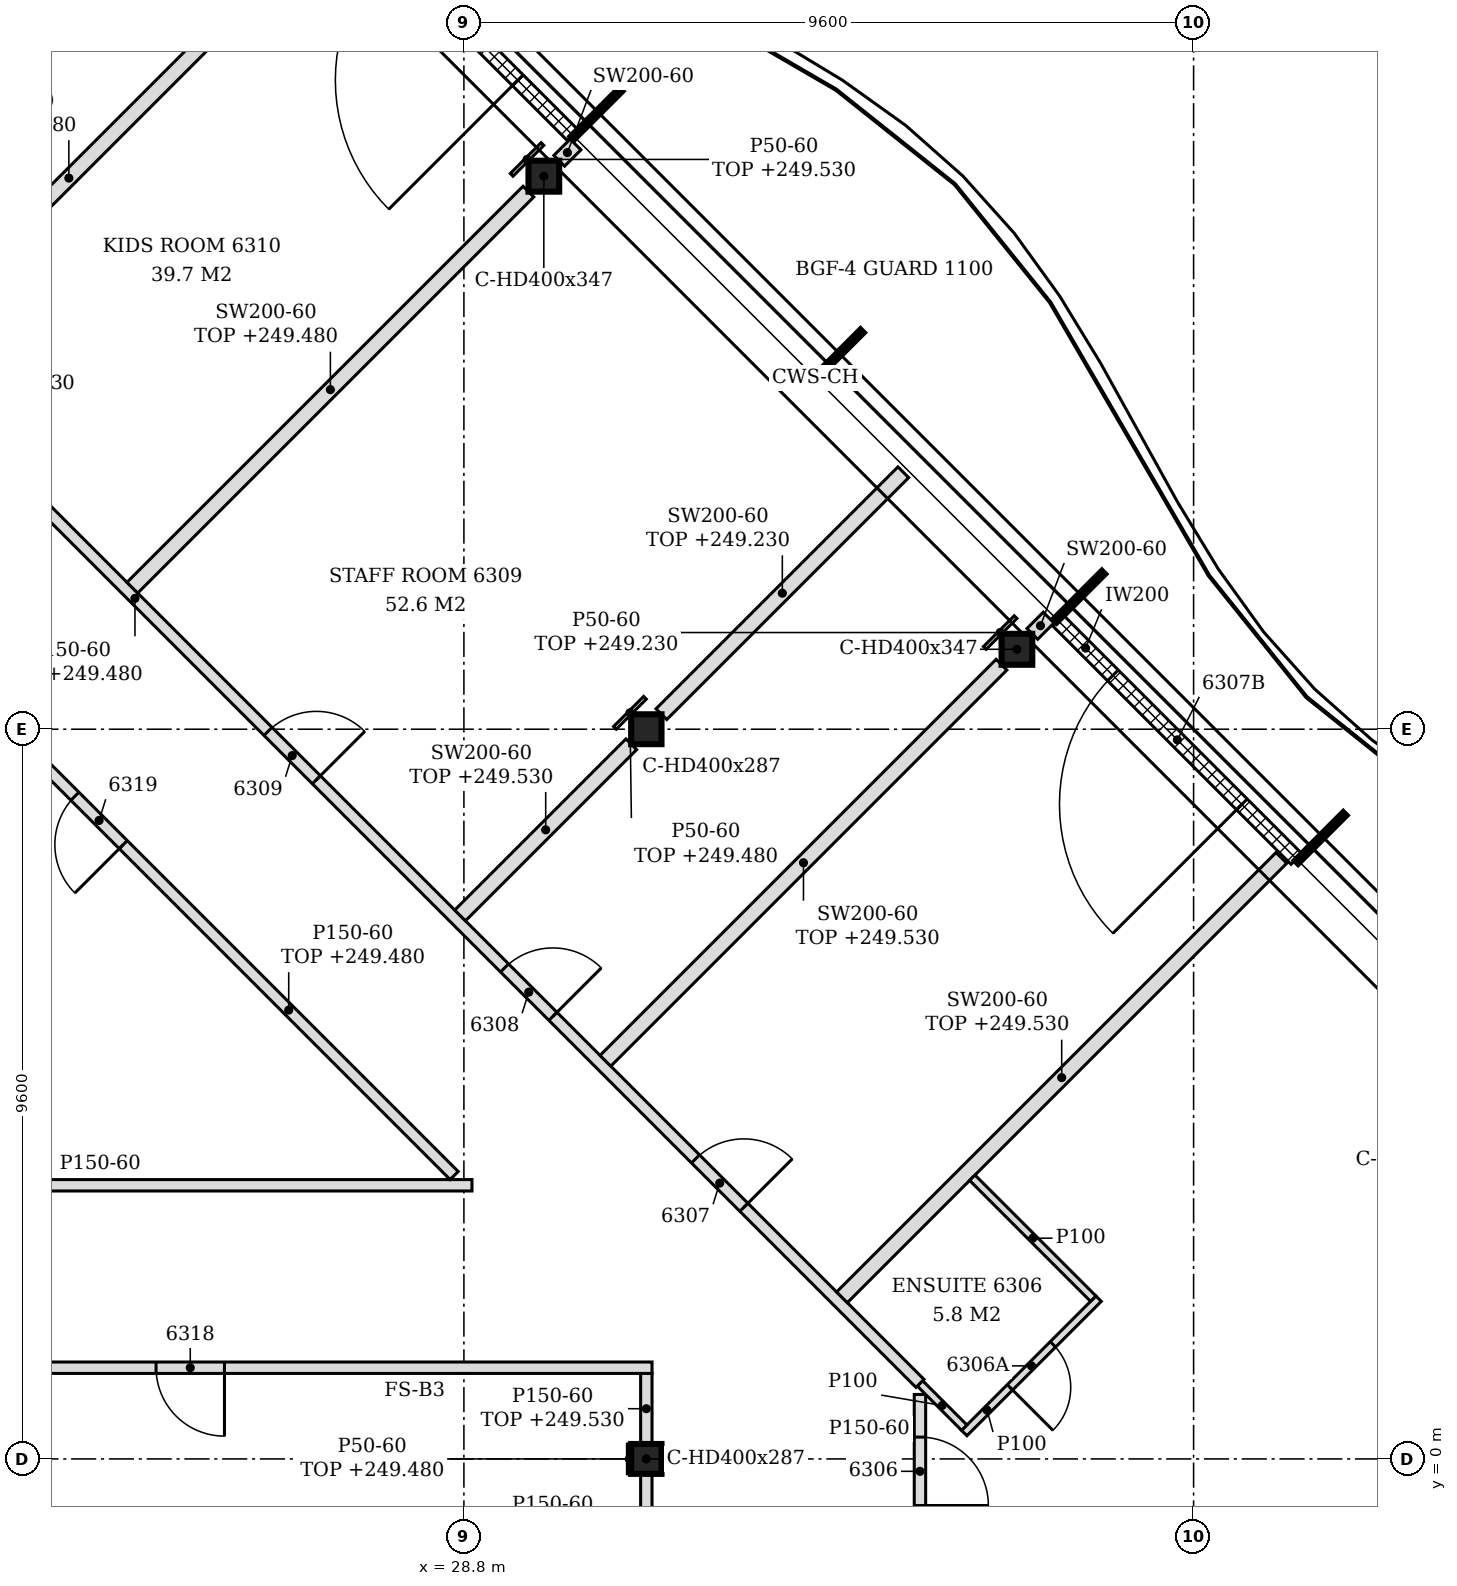
"""IFC4 building model, lengths in metres.
Left out: names, types, materials, properties, quantities, classifications, styles, units other than length and angle.
Written with IfcOpenShell. Run it as: python <this file> out.ifc"""

import sys

from ifc_helpers import new_model, si_unit, direction, frame, frame_2d, origin, origin_2d, place, context, subcontext, project, spatial, polyline, rectangle, i_section, outline, extrude, element, fill, save


model = new_model("IFC4")
c1 = context("Model", 3, precision=1e-05, world=origin(), true_north=direction((0.0, 1.0)))
c2 = subcontext(c1, "Body", "Model", "MODEL_VIEW")
j1 = project(units=[si_unit("LENGTHUNIT", "METRE"), si_unit("PLANEANGLEUNIT", "RADIAN")], contexts=[c1])
p1 = place(None, origin())
s1 = spatial("IfcSite", under=j1, at=p1, CompositionType="ELEMENT")
p2 = place(p1, origin())
s2 = spatial("IfcBuilding", under=s1, at=p2, CompositionType="ELEMENT")
p3 = place(p2, frame((0.0, 0.0, 246.6)))
s3 = spatial("IfcBuildingStorey", under=s2, at=p3, CompositionType="ELEMENT", Elevation=246.6)
for number, where, z_axis, x_axis in (
    (1, (36.076, 10.652, -0.15), (0.0, 0.0, 1.0), (1.0, 0.0, 0.0)),
    (2, (29.852, 16.876, -0.15), (0.0, 0.0, 1.0), (1.0, 0.0, 0.0)),
):
    element("IfcColumn", number, at=place(p3, frame(where, z_axis=z_axis, x_axis=x_axis)), inside=s3, PredefinedType="COLUMN", context=c2, shape_type="SweptSolid", body=[
        extrude(i_section(OverallWidth=0.404, OverallDepth=0.407, WebThickness=0.027, FlangeThickness=0.044, FilletRadius=0.015, at=origin_2d()), origin(), (0.0, 0.0, 1.0), 3.6),
    ])
for number, where, z_axis, x_axis in (
    (3, (31.2, 0.0, -0.15), (0.0, 0.0, 1.0), (1.0, 0.0, 0.0)),
    (4, (31.2, 9.6, -0.15), (0.0, 0.0, 1.0), (1.0, 0.0, 0.0)),
):
    element("IfcColumn", number, at=place(p3, frame(where, z_axis=z_axis, x_axis=x_axis)), inside=s3, PredefinedType="COLUMN", context=c2, shape_type="SweptSolid", body=[
        extrude(i_section(OverallWidth=0.399, OverallDepth=0.393, WebThickness=0.023, FlangeThickness=0.037, FilletRadius=0.015, at=origin_2d()), origin(), (0.0, 0.0, 1.0), 3.6),
    ])
p4 = place(p3, frame((39.753, 7.893, 0.0), z_axis=(0.0, 0.0, 1.0), x_axis=(-0.707106781187, 0.707106781187, 0.0)))
e5 = element("IfcWall", 5, at=p4, inside=s3, PredefinedType="NOTDEFINED", context=c2, shape_type="SweptSolid", body=[
    extrude(rectangle(XDim=4.431, YDim=0.2, at=frame_2d((2.215, 0.0))), origin(), (0.0, 0.0, 1.0), 3.45),
])
p5 = place(p4, frame((1.015, 0.0, 0.0)))
e6 = element("IfcOpeningElement", 6, at=p5, cuts=e5, PredefinedType="OPENING", context=c2, shape_type="SweptSolid", body=[
    extrude(rectangle(XDim=2.4, YDim=2.4, at=frame_2d((1.2, 1.2))), frame((0.0, 0.11, 0.0), z_axis=(0.0, -1.0, 0.0), x_axis=(1.0, 0.0, 0.0)), (0.0, 0.0, 1.0), 0.22),
])
p6 = place(p3, frame((30.226, 17.42, 0.0), z_axis=(0.0, 0.0, 1.0), x_axis=(-0.707079231393, 0.707134329907, 0.0)))
e7 = element("IfcWall", 7, at=p6, inside=s3, PredefinedType="NOTDEFINED", context=c2, shape_type="SweptSolid", body=[
    extrude(rectangle(XDim=4.431, YDim=0.2, at=frame_2d((2.215, 0.0))), origin(), (0.0, 0.0, 1.0), 3.45),
])
p7 = place(p6, frame((1.015, 0.0, 0.0)))
e8 = element("IfcOpeningElement", 8, at=p7, cuts=e7, PredefinedType="OPENING", context=c2, shape_type="SweptSolid", body=[
    extrude(rectangle(XDim=2.4, YDim=2.4, at=frame_2d((1.2, 1.2))), frame((0.0, 0.11, 0.0), z_axis=(0.0, -1.0, 0.0), x_axis=(1.0, 0.0, 0.0)), (0.0, 0.0, 1.0), 0.22),
])
p8 = place(p3, frame((31.2, -1.345, 0.0), z_axis=(0.0, 0.0, 1.0), x_axis=(0.0, 1.0, 0.0)))
e9 = element("IfcWall", 9, at=p8, inside=s3, PredefinedType="PARTITIONING", context=c2, shape_type="SweptSolid", body=[
    extrude(rectangle(XDim=1.148, YDim=0.15, at=frame_2d((0.574, 0.0))), origin(), (0.0, 0.0, 1.0), 2.93),
])
p9 = place(p3, frame((34.8, -1.14, 0.0), z_axis=(0.0, 0.0, 1.0), x_axis=(0.0, 1.0, 0.0)))
e10 = element("IfcWall", 10, at=p9, inside=s3, PredefinedType="PARTITIONING", context=c2, shape_type="SweptSolid", body=[
    extrude(outline(polyline([(0.0, 0.0), (1.988, 0.0), (1.988, 3.45), (1.245, 3.45), (1.243, 2.88), (1.035, 2.88), (1.033, 3.45), (0.0, 3.45), (0.0, 0.0)])), frame((0.0, 0.075, 0.0), z_axis=(0.0, -1.0, 0.0), x_axis=(1.0, 0.0, 0.0)), (0.0, 0.0, 1.0), 0.15),
])
p10 = place(p9, frame((0.527, 0.0, 0.0)))
e11 = element("IfcOpeningElement", 11, at=p10, cuts=e10, PredefinedType="OPENING", context=c2, shape_type="SweptSolid", body=[
    extrude(rectangle(XDim=0.9, YDim=2.1, at=frame_2d((0.45, 1.05))), frame((0.0, 0.085, 0.0), z_axis=(0.0, -1.0, 0.0), x_axis=(1.0, 0.0, 0.0)), (0.0, 0.0, 1.0), 0.17),
])
p11 = place(p3, frame((31.2, 0.197, 0.0), z_axis=(0.0, 0.0, 1.0), x_axis=(0.0, 1.0, 0.0)))
e12 = element("IfcWall", 12, at=p11, inside=s3, PredefinedType="PARTITIONING", context=c2, shape_type="SweptSolid", body=[
    extrude(rectangle(XDim=0.928, YDim=0.15, at=frame_2d((0.464, 0.0))), origin(), (0.0, 0.0, 1.0), 2.93),
])
p12 = place(p3, frame((35.383, 0.341, 0.0), z_axis=(0.0, 0.0, 1.0), x_axis=(0.707106781187, 0.707106781187, 0.0)))
e13 = element("IfcWall", 13, at=p12, inside=s3, PredefinedType="PARTITIONING", context=c2, shape_type="SweptSolid", body=[
    extrude(rectangle(XDim=2.5, YDim=0.1, at=frame_2d((1.25, 0.0))), origin(), (0.0, 0.0, 1.0), 3.45),
])
p13 = place(p12, frame((0.85, 0.0, 0.0)))
e14 = element("IfcOpeningElement", 14, at=p13, cuts=e13, PredefinedType="OPENING", context=c2, shape_type="SweptSolid", body=[
    extrude(rectangle(XDim=0.8, YDim=2.1, at=frame_2d((0.4, 1.05))), frame((0.0, 0.06, 0.0), z_axis=(0.0, -1.0, 0.0), x_axis=(1.0, 0.0, 0.0)), (0.0, 0.0, 1.0), 0.12),
])
p14 = place(p3, frame((35.383, 0.411, 0.0), z_axis=(0.0, 0.0, 1.0), x_axis=(-0.707106781187, 0.707106781187, 0.0)))
e15 = element("IfcWall", 15, at=p14, inside=s3, PredefinedType="PARTITIONING", context=c2, shape_type="SweptSolid", body=[
    extrude(rectangle(XDim=0.824, YDim=0.1, at=frame_2d((0.412, 0.0))), origin(), (0.0, 0.0, 1.0), 3.45),
])
p15 = place(p3, frame((34.8, 0.994, 0.0), z_axis=(0.0, 0.0, 1.0), x_axis=(-0.707099634543, 0.707113927758, 0.0)))
e16 = element("IfcWall", 16, at=p15, inside=s3, PredefinedType="PARTITIONING", context=c2, shape_type="SweptSolid", body=[
    extrude(rectangle(XDim=17.081, YDim=0.15, at=frame_2d((8.541, 0.0))), origin(), (0.0, 0.0, 1.0), 2.88),
])
p16 = place(p15, frame((3.276, 0.0, 0.0)))
e17 = element("IfcOpeningElement", 17, at=p16, cuts=e16, PredefinedType="OPENING", context=c2, shape_type="SweptSolid", body=[
    extrude(rectangle(XDim=0.9, YDim=2.1, at=frame_2d((0.45, 1.05))), frame((0.0, 0.085, 0.0), z_axis=(0.0, -1.0, 0.0), x_axis=(1.0, 0.0, 0.0)), (0.0, 0.0, 1.0), 0.17),
])
p17 = place(p15, frame((6.829, 0.0, 0.0)))
e18 = element("IfcOpeningElement", 18, at=p17, cuts=e16, PredefinedType="OPENING", context=c2, shape_type="SweptSolid", body=[
    extrude(rectangle(XDim=0.9, YDim=2.1, at=frame_2d((0.45, 1.05))), frame((0.0, 0.085, 0.0), z_axis=(0.0, -1.0, 0.0), x_axis=(1.0, 0.0, 0.0)), (0.0, 0.0, 1.0), 0.17),
])
p18 = place(p15, frame((11.23, 0.0, 0.0)))
e19 = element("IfcOpeningElement", 19, at=p18, cuts=e16, PredefinedType="OPENING", context=c2, shape_type="SweptSolid", body=[
    extrude(rectangle(XDim=0.9, YDim=2.1, at=frame_2d((0.45, 1.05))), frame((0.0, 0.085, 0.0), z_axis=(0.0, -1.0, 0.0), x_axis=(1.0, 0.0, 0.0)), (0.0, 0.0, 1.0), 0.17),
])
p19 = place(p3, frame((19.125, 1.2, 0.0), z_axis=(0.0, 0.0, 1.0), x_axis=(1.0, 0.0, 0.0)))
e20 = element("IfcWall", 20, at=p19, inside=s3, PredefinedType="PARTITIONING", context=c2, shape_type="SweptSolid", body=[
    extrude(outline(polyline([(0.0, 0.0), (12.15, 0.0), (12.15, 2.93), (11.925, 2.93), (11.923, 3.45), (0.225, 3.45), (0.223, 2.83), (0.0, 2.83), (0.0, 0.0)])), frame((0.0, 0.075, 0.0), z_axis=(0.0, -1.0, 0.0), x_axis=(1.0, 0.0, 0.0)), (0.0, 0.0, 1.0), 0.15),
])
p20 = place(p19, frame((5.625, 0.0, 0.0)))
e21 = element("IfcOpeningElement", 21, at=p20, cuts=e20, PredefinedType="OPENING", context=c2, shape_type="SweptSolid", body=[
    extrude(rectangle(XDim=0.9, YDim=2.1, at=frame_2d((0.45, 1.05))), frame((0.0, 0.085, 0.0), z_axis=(0.0, -1.0, 0.0), x_axis=(1.0, 0.0, 0.0)), (0.0, 0.0, 1.0), 0.17),
])
p21 = place(p3, frame((33.774, 2.126, 0.0), z_axis=(0.0, 0.0, 1.0), x_axis=(0.707121711178, 0.70709185088, 0.0)))
e22 = element("IfcWall", 22, at=p21, inside=s3, PredefinedType="PARTITIONING", context=c2, shape_type="SweptSolid", body=[
    extrude(rectangle(XDim=8.176, YDim=0.2, at=frame_2d((4.088, 0.0))), origin(), (0.0, 0.0, 1.0), 2.93),
])
p22 = place(p3, frame((37.08, 2.108, 0.0), z_axis=(0.0, 0.0, 1.0), x_axis=(-0.707106781187, 0.707106781187, 0.0)))
e23 = element("IfcWall", 23, at=p22, inside=s3, PredefinedType="PARTITIONING", context=c2, shape_type="SweptSolid", body=[
    extrude(rectangle(XDim=2.25, YDim=0.1, at=frame_2d((1.125, 0.0))), origin(), (0.0, 0.0, 1.0), 3.45),
])
p23 = place(p3, frame((19.125, 3.6, 0.0), z_axis=(0.0, 0.0, 1.0), x_axis=(1.0, 0.0, 0.0)))
e24 = element("IfcWall", 24, at=p23, inside=s3, PredefinedType="PARTITIONING", context=c2, shape_type="SweptSolid", body=[
    extrude(outline(polyline([(0.0, 0.0), (9.781, 0.0), (9.781, 3.45), (0.225, 3.45), (0.223, 2.83), (0.0, 2.83), (0.0, 0.0)])), frame((0.0, 0.075, 0.0), z_axis=(0.0, -1.0, 0.0), x_axis=(1.0, 0.0, 0.0)), (0.0, 0.0, 1.0), 0.15),
])
p24 = place(p3, frame((28.672, 3.728, 0.0), z_axis=(0.0, 0.0, 1.0), x_axis=(-0.707106781187, 0.707106781187, 0.0)))
e25 = element("IfcWall", 25, at=p24, inside=s3, PredefinedType="PARTITIONING", context=c2, shape_type="SweptSolid", body=[
    extrude(rectangle(XDim=13.124, YDim=0.15, at=frame_2d((6.562, 0.0))), origin(), (0.0, 0.0, 1.0), 2.88),
])
p25 = place(p24, frame((6.157, 0.0, 0.0)))
e26 = element("IfcOpeningElement", 26, at=p25, cuts=e25, PredefinedType="OPENING", context=c2, shape_type="SweptSolid", body=[
    extrude(rectangle(XDim=0.9, YDim=2.1, at=frame_2d((0.45, 1.05))), frame((0.0, 0.085, 0.0), z_axis=(0.0, -1.0, 0.0), x_axis=(1.0, 0.0, 0.0)), (0.0, 0.0, 1.0), 0.17),
])
p26 = place(p3, frame((30.662, 5.238, 0.0), z_axis=(0.0, 0.0, 1.0), x_axis=(0.707106781187, 0.707106781187, 0.0)))
e27 = element("IfcWall", 27, at=p26, inside=s3, PredefinedType="PARTITIONING", context=c2, shape_type="SweptSolid", body=[
    extrude(rectangle(XDim=7.369, YDim=0.2, at=frame_2d((3.685, 0.0))), origin(), (0.0, 0.0, 1.0), 2.93),
])
p27 = place(p3, frame((28.75, 7.15, 0.0), z_axis=(0.0, 0.0, 1.0), x_axis=(0.7070684525, 0.707145107796, 0.0)))
e28 = element("IfcWall", 28, at=p27, inside=s3, PredefinedType="PARTITIONING", context=c2, shape_type="SweptSolid", body=[
    extrude(rectangle(XDim=3.185, YDim=0.2, at=frame_2d((1.592, 0.0))), origin(), (0.0, 0.0, 1.0), 2.93),
])
p28 = place(p3, frame((31.398, 9.798, 0.0), z_axis=(0.0, 0.0, 1.0), x_axis=(0.707133900936, 0.707079660397, 0.0)))
e29 = element("IfcWall", 29, at=p28, inside=s3, PredefinedType="PARTITIONING", context=c2, shape_type="SweptSolid", body=[
    extrude(rectangle(XDim=4.501, YDim=0.2, at=frame_2d((2.25, 0.0))), origin(), (0.0, 0.0, 1.0), 2.63),
])
p29 = place(p3, frame((36.278, 10.854, 0.0), z_axis=(0.0, 0.0, 1.0), x_axis=(0.707509117806, 0.706704215511, 0.0)))
e30 = element("IfcWall", 30, at=p29, inside=s3, PredefinedType="PARTITIONING", context=c2, shape_type="SweptSolid", body=[
    extrude(rectangle(XDim=0.303, YDim=0.2, at=frame_2d((0.152, 0.0))), origin(), (0.0, 0.0, 1.0), 3.45),
])
p30 = place(p3, frame((24.438, 11.462, 0.0), z_axis=(0.0, 0.0, 1.0), x_axis=(0.707090216072, 0.707123345913, 0.0)))
e31 = element("IfcWall", 31, at=p30, inside=s3, PredefinedType="PARTITIONING", context=c2, shape_type="SweptSolid", body=[
    extrude(rectangle(XDim=7.369, YDim=0.2, at=frame_2d((3.685, 0.0))), origin(), (0.0, 0.0, 1.0), 2.88),
])
p31 = place(p3, frame((20.098, 13.346, 0.0), z_axis=(0.0, 0.0, 1.0), x_axis=(0.707119095079, 0.70709446708, 0.0)))
e32 = element("IfcWall", 32, at=p31, inside=s3, PredefinedType="PARTITIONING", context=c2, shape_type="SweptSolid", body=[
    extrude(rectangle(XDim=9.913, YDim=0.2, at=frame_2d((4.957, 0.0))), origin(), (0.0, 0.0, 1.0), 2.88),
])
p32 = place(p3, frame((30.054, 17.078, 0.0), z_axis=(0.0, 0.0, 1.0), x_axis=(0.707106781187, 0.707106781187, 0.0)))
e33 = element("IfcWall", 33, at=p32, inside=s3, PredefinedType="PARTITIONING", context=c2, shape_type="SweptSolid", body=[
    extrude(rectangle(XDim=0.303, YDim=0.2, at=frame_2d((0.152, 0.0))), origin(), (0.0, 0.0, 1.0), 3.45),
])
p33 = place(p3, frame((30.976, -0.197, 0.0), z_axis=(0.0, 0.0, 1.0), x_axis=(0.0, 1.0, 0.0)))
e34 = element("IfcWall", 34, at=p33, inside=s3, PredefinedType="PARTITIONING", context=c2, shape_type="SweptSolid", body=[
    extrude(rectangle(XDim=0.393, YDim=0.05, at=frame_2d((0.197, 0.0))), origin(), (0.0, 0.0, 1.0), 2.88),
])
p34 = place(p3, frame((35.653, 10.669, 0.0), z_axis=(0.0, 0.0, 1.0), x_axis=(0.707106781187, 0.707106781187, 0.0)))
e35 = element("IfcWall", 35, at=p34, inside=s3, PredefinedType="PARTITIONING", context=c2, shape_type="SweptSolid", body=[
    extrude(rectangle(XDim=0.573, YDim=0.05, at=frame_2d((0.287, 0.0))), origin(), (0.0, 0.0, 1.0), 2.63),
])
p35 = place(p3, frame((30.786, 9.618, 0.0), z_axis=(0.0, 0.0, 1.0), x_axis=(0.707106781187, 0.707106781187, 0.0)))
e36 = element("IfcWall", 36, at=p35, inside=s3, PredefinedType="PARTITIONING", context=c2, shape_type="SweptSolid", body=[
    extrude(rectangle(XDim=0.56, YDim=0.05, at=frame_2d((0.28, 0.0))), origin(), (0.0, 0.0, 1.0), 2.88),
])
p36 = place(p3, frame((29.428, 16.893, 0.0), z_axis=(0.0, 0.0, 1.0), x_axis=(0.707106781187, 0.707106781187, 0.0)))
e37 = element("IfcWall", 37, at=p36, inside=s3, PredefinedType="PARTITIONING", context=c2, shape_type="SweptSolid", body=[
    extrude(rectangle(XDim=0.573, YDim=0.05, at=frame_2d((0.287, 0.0))), origin(), (0.0, 0.0, 1.0), 2.93),
])
p37 = place(p5, origin())
e38 = element("IfcDoor", 38, at=p37, inside=s3, OperationType="SINGLE_SWING_LEFT", PredefinedType="DOOR", context=c2, shape_type="SweptSolid", body=[
    extrude(rectangle(XDim=2.4, YDim=2.4, at=frame_2d((1.2, 1.2))), frame((0.0, 0.025, 0.0), z_axis=(0.0, -1.0, 0.0), x_axis=(1.0, 0.0, 0.0)), (0.0, 0.0, 1.0), 0.05),
])
fill(e6, e38)
p38 = place(p7, origin())
e39 = element("IfcDoor", 39, at=p38, inside=s3, OperationType="SINGLE_SWING_LEFT", PredefinedType="DOOR", context=c2, shape_type="SweptSolid", body=[
    extrude(rectangle(XDim=2.4, YDim=2.4, at=frame_2d((1.2, 1.2))), frame((0.0, 0.025, 0.0), z_axis=(0.0, -1.0, 0.0), x_axis=(1.0, 0.0, 0.0)), (0.0, 0.0, 1.0), 0.05),
])
fill(e8, e39)
p39 = place(p10, frame((0.9, 0.0, 0.0), z_axis=(0.0, 0.0, 1.0), x_axis=(-1.0, 0.0, 0.0)))
e40 = element("IfcDoor", 40, at=p39, inside=s3, OperationType="SINGLE_SWING_RIGHT", PredefinedType="DOOR", context=c2, shape_type="SweptSolid", body=[
    extrude(rectangle(XDim=0.9, YDim=2.1, at=frame_2d((0.45, 1.05))), frame((0.0, 0.025, 0.0), z_axis=(0.0, -1.0, 0.0), x_axis=(1.0, 0.0, 0.0)), (0.0, 0.0, 1.0), 0.05),
])
fill(e11, e40)
p40 = place(p13, frame((0.8, 0.0, 0.0), z_axis=(0.0, 0.0, 1.0), x_axis=(-1.0, 0.0, 0.0)))
e41 = element("IfcDoor", 41, at=p40, inside=s3, OperationType="SINGLE_SWING_RIGHT", PredefinedType="DOOR", context=c2, shape_type="SweptSolid", body=[
    extrude(rectangle(XDim=0.8, YDim=2.1, at=frame_2d((0.4, 1.05))), frame((0.0, 0.025, 0.0), z_axis=(0.0, -1.0, 0.0), x_axis=(1.0, 0.0, 0.0)), (0.0, 0.0, 1.0), 0.05),
])
fill(e14, e41)
p41 = place(p16, frame((0.9, 0.0, 0.0), z_axis=(0.0, 0.0, 1.0), x_axis=(-1.0, 0.0, 0.0)))
e42 = element("IfcDoor", 42, at=p41, inside=s3, OperationType="SINGLE_SWING_RIGHT", PredefinedType="DOOR", context=c2, shape_type="SweptSolid", body=[
    extrude(rectangle(XDim=0.9, YDim=2.1, at=frame_2d((0.45, 1.05))), frame((0.0, 0.025, 0.0), z_axis=(0.0, -1.0, 0.0), x_axis=(1.0, 0.0, 0.0)), (0.0, 0.0, 1.0), 0.05),
])
fill(e17, e42)
p42 = place(p17, frame((0.9, 0.0, 0.0), z_axis=(0.0, 0.0, 1.0), x_axis=(-1.0, 0.0, 0.0)))
e43 = element("IfcDoor", 43, at=p42, inside=s3, OperationType="SINGLE_SWING_RIGHT", PredefinedType="DOOR", context=c2, shape_type="SweptSolid", body=[
    extrude(rectangle(XDim=0.9, YDim=2.1, at=frame_2d((0.45, 1.05))), frame((0.0, 0.025, 0.0), z_axis=(0.0, -1.0, 0.0), x_axis=(1.0, 0.0, 0.0)), (0.0, 0.0, 1.0), 0.05),
])
fill(e18, e43)
p43 = place(p18, frame((0.9, 0.0, 0.0), z_axis=(0.0, 0.0, 1.0), x_axis=(-1.0, 0.0, 0.0)))
e44 = element("IfcDoor", 44, at=p43, inside=s3, OperationType="SINGLE_SWING_RIGHT", PredefinedType="DOOR", context=c2, shape_type="SweptSolid", body=[
    extrude(rectangle(XDim=0.9, YDim=2.1, at=frame_2d((0.45, 1.05))), frame((0.0, 0.025, 0.0), z_axis=(0.0, -1.0, 0.0), x_axis=(1.0, 0.0, 0.0)), (0.0, 0.0, 1.0), 0.05),
])
fill(e19, e44)
p44 = place(p20, frame((0.9, 0.0, 0.0), z_axis=(0.0, 0.0, 1.0), x_axis=(-1.0, 0.0, 0.0)))
e45 = element("IfcDoor", 45, at=p44, inside=s3, OperationType="SINGLE_SWING_LEFT", PredefinedType="DOOR", context=c2, shape_type="SweptSolid", body=[
    extrude(rectangle(XDim=0.9, YDim=2.1, at=frame_2d((0.45, 1.05))), frame((0.0, 0.025, 0.0), z_axis=(0.0, -1.0, 0.0), x_axis=(1.0, 0.0, 0.0)), (0.0, 0.0, 1.0), 0.05),
])
fill(e21, e45)
p45 = place(p25, origin())
e46 = element("IfcDoor", 46, at=p45, inside=s3, OperationType="SINGLE_SWING_LEFT", PredefinedType="DOOR", context=c2, shape_type="SweptSolid", body=[
    extrude(rectangle(XDim=0.9, YDim=2.1, at=frame_2d((0.45, 1.05))), frame((0.0, 0.025, 0.0), z_axis=(0.0, -1.0, 0.0), x_axis=(1.0, 0.0, 0.0)), (0.0, 0.0, 1.0), 0.05),
])
fill(e26, e46)
save(model, sys.argv[1])
